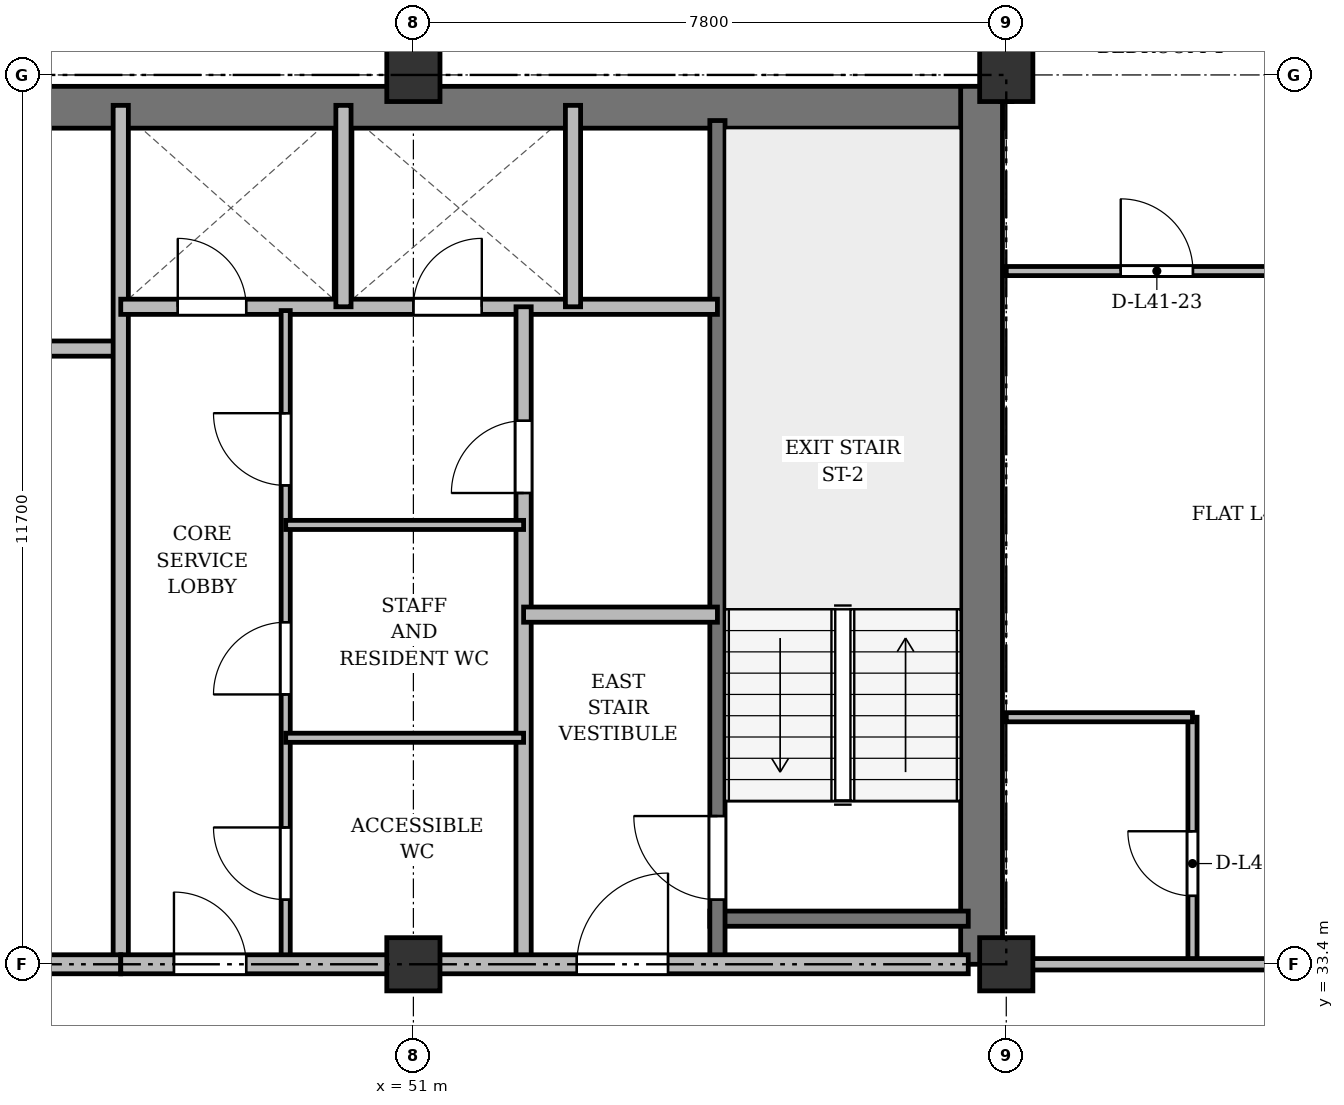
"""IFC4 building model, lengths in metres.
Left out: names, types, materials, properties, quantities, classifications, styles, units other than length and angle.
Written with IfcOpenShell. Run it as: python <this file> out.ifc"""

import sys

from ifc_helpers import new_model, si_unit, direction, frame, frame_2d, origin, origin_2d, place, context, subcontext, project, spatial, rectangle, extrude, source, transform, mapped, element, fill, save


model = new_model("IFC4")
c1 = context("Model", 3, precision=1e-05, world=origin(), true_north=direction((0.0, 1.0)))
c2 = subcontext(c1, "Body", "Model", "MODEL_VIEW")
j1 = project(units=[si_unit("LENGTHUNIT", "METRE"), si_unit("PLANEANGLEUNIT", "RADIAN")], contexts=[c1])
p1 = place(None, origin())
s1 = spatial("IfcSite", under=j1, at=p1, CompositionType="ELEMENT")
p2 = place(p1, origin())
s2 = spatial("IfcBuilding", under=s1, at=p2, CompositionType="ELEMENT")
p3 = place(p2, frame((0.0, 0.0, 157.3)))
s3 = spatial("IfcBuildingStorey", under=s2, at=p3, CompositionType="ELEMENT", Elevation=157.3)
m1 = source(origin(), c2, "Body", "SweptSolid", [
    extrude(rectangle(XDim=0.7, YDim=0.7, at=origin_2d()), origin(), (0.0, 0.0, 1.0), 3.6),
])
for number, where, z_axis, x_axis in (
    (1, (51.0, 33.4, 0.0), (0.0, 0.0, 1.0), (1.0, 0.0, 0.0)),
    (2, (51.0, 45.1, 0.0), (0.0, 0.0, 1.0), (1.0, 0.0, 0.0)),
    (3, (58.8, 33.4, 0.0), (0.0, 0.0, 1.0), (1.0, 0.0, 0.0)),
    (4, (58.8, 45.1, 0.0), (0.0, 0.0, 1.0), (1.0, 0.0, 0.0)),
):
    element("IfcColumn", number, at=place(p3, frame(where, z_axis=z_axis, x_axis=x_axis)), inside=s3, PredefinedType="COLUMN", context=c2, shape_type="MappedRepresentation", body=[
        mapped(m1, transform((0.0, 0.0, 0.0), x_axis=(1.0, 0.0, 0.0), y_axis=(0.0, 1.0, 0.0), z_axis=(0.0, 0.0, 1.0), scale=1.0)),
    ])
p4 = place(p3, frame((15.65, 44.675, 0.0), z_axis=(0.0, 0.0, 1.0), x_axis=(1.0, 0.0, 0.0)))
e5 = element("IfcWall", 5, at=p4, inside=s3, PredefinedType="SHEAR", context=c2, shape_type="SweptSolid", body=[
    extrude(rectangle(XDim=43.1, YDim=0.55, at=frame_2d((21.55, 0.0))), origin(), (0.0, 0.0, 1.0), 3.35),
])
p5 = place(p3, frame((58.475, 33.4, 0.0), z_axis=(0.0, 0.0, 1.0), x_axis=(0.0, 1.0, 0.0)))
e6 = element("IfcWall", 6, at=p5, inside=s3, PredefinedType="SHEAR", context=c2, shape_type="SweptSolid", body=[
    extrude(rectangle(XDim=11.55, YDim=0.55, at=frame_2d((5.775, 0.0))), origin(), (0.0, 0.0, 1.0), 3.35),
])
p6 = place(p3, frame((54.9, 34.0, 0.0), z_axis=(0.0, 0.0, 1.0), x_axis=(1.0, 0.0, 0.0)))
e7 = element("IfcWall", 7, at=p6, inside=s3, PredefinedType="SHEAR", context=c2, shape_type="SweptSolid", body=[
    extrude(rectangle(XDim=3.4, YDim=0.2, at=frame_2d((1.7, 0.0))), origin(), (0.0, 0.0, 1.0), 3.35),
])
p7 = place(p3, frame((55.0, 33.4, 0.0), z_axis=(0.0, 0.0, 1.0), x_axis=(0.0, 1.0, 0.0)))
e8 = element("IfcWall", 8, at=p7, inside=s3, PredefinedType="SHEAR", context=c2, shape_type="SweptSolid", body=[
    extrude(rectangle(XDim=11.1, YDim=0.2, at=frame_2d((5.55, 0.0))), origin(), (0.0, 0.0, 1.0), 3.35),
])
p8 = place(p7, frame((0.85, 0.0, 0.0)))
e9 = element("IfcOpeningElement", 9, at=p8, cuts=e8, PredefinedType="OPENING", context=c2, shape_type="SweptSolid", body=[
    extrude(rectangle(XDim=1.1, YDim=2.15, at=frame_2d((0.55, 1.075))), frame((0.0, 0.11, 0.0), z_axis=(0.0, -1.0, 0.0), x_axis=(1.0, 0.0, 0.0)), (0.0, 0.0, 1.0), 0.22),
])
p9 = place(p3, frame((40.25, 41.5, 0.0), z_axis=(0.0, 0.0, 1.0), x_axis=(1.0, 0.0, 0.0)))
e10 = element("IfcWall", 10, at=p9, inside=s3, PredefinedType="SOLIDWALL", context=c2, shape_type="SweptSolid", body=[
    extrude(rectangle(XDim=6.9, YDim=0.2, at=frame_2d((3.45, 0.0))), origin(), (0.0, 0.0, 1.0), 2.85),
])
p10 = place(p3, frame((47.15, 33.4, 0.0), z_axis=(0.0, 0.0, 1.0), x_axis=(0.0, 1.0, 0.0)))
e11 = element("IfcWall", 11, at=p10, inside=s3, PredefinedType="SOLIDWALL", context=c2, shape_type="SweptSolid", body=[
    extrude(rectangle(XDim=11.3, YDim=0.2, at=frame_2d((5.65, 0.0))), origin(), (0.0, 0.0, 1.0), 2.75),
])
p11 = place(p3, frame((33.3, 33.4, 0.0), z_axis=(0.0, 0.0, 1.0), x_axis=(1.0, 0.0, 0.0)))
e12 = element("IfcWall", 12, at=p11, inside=s3, PredefinedType="PARTITIONING", context=c2, shape_type="SweptSolid", body=[
    extrude(rectangle(XDim=13.85, YDim=0.25, at=frame_2d((6.925, 0.0))), origin(), (0.0, 0.0, 1.0), 2.75),
])
p12 = place(p11, frame((4.2, 0.0, 0.0)))
e13 = element("IfcOpeningElement", 13, at=p12, cuts=e12, PredefinedType="OPENING", context=c2, shape_type="SweptSolid", body=[
    extrude(rectangle(XDim=1.6, YDim=2.2, at=frame_2d((0.8, 1.1))), frame((0.0, 0.135, 0.0), z_axis=(0.0, -1.0, 0.0), x_axis=(1.0, 0.0, 0.0)), (0.0, 0.0, 1.0), 0.27),
])
p13 = place(p3, frame((47.15, 42.05, 0.0), z_axis=(0.0, 0.0, 1.0), x_axis=(1.0, 0.0, 0.0)))
e14 = element("IfcWall", 14, at=p13, inside=s3, PredefinedType="SOLIDWALL", context=c2, shape_type="SweptSolid", body=[
    extrude(rectangle(XDim=7.85, YDim=0.2, at=frame_2d((3.925, 0.0))), origin(), (0.0, 0.0, 1.0), 2.85),
])
p14 = place(p13, frame((0.75, 0.0, 0.0)))
e15 = element("IfcOpeningElement", 15, at=p14, cuts=e14, PredefinedType="OPENING", context=c2, shape_type="SweptSolid", body=[
    extrude(rectangle(XDim=0.9, YDim=2.1, at=frame_2d((0.45, 1.05))), frame((0.0, 0.11, 0.0), z_axis=(0.0, -1.0, 0.0), x_axis=(1.0, 0.0, 0.0)), (0.0, 0.0, 1.0), 0.22),
])
p15 = place(p13, frame((3.85, 0.0, 0.0)))
e16 = element("IfcOpeningElement", 16, at=p15, cuts=e14, PredefinedType="OPENING", context=c2, shape_type="SweptSolid", body=[
    extrude(rectangle(XDim=0.9, YDim=2.1, at=frame_2d((0.45, 1.05))), frame((0.0, 0.11, 0.0), z_axis=(0.0, -1.0, 0.0), x_axis=(1.0, 0.0, 0.0)), (0.0, 0.0, 1.0), 0.22),
])
for number, where, z_axis, x_axis in (
    (17, (50.08, 42.05, 0.0), (0.0, 0.0, 1.0), (0.0, 1.0, 0.0)),
    (18, (53.1, 42.05, 0.0), (0.0, 0.0, 1.0), (0.0, 1.0, 0.0)),
):
    element("IfcWall", number, at=place(p3, frame(where, z_axis=z_axis, x_axis=x_axis)), inside=s3, PredefinedType="SOLIDWALL", context=c2, shape_type="SweptSolid", body=[
        extrude(rectangle(XDim=2.65, YDim=0.2, at=frame_2d((1.325, 0.0))), origin(), (0.0, 0.0, 1.0), 3.35),
    ])
p16 = place(p3, frame((52.45, 33.4, 0.0), z_axis=(0.0, 0.0, 1.0), x_axis=(0.0, 1.0, 0.0)))
e19 = element("IfcWall", 19, at=p16, inside=s3, PredefinedType="PARTITIONING", context=c2, shape_type="SweptSolid", body=[
    extrude(rectangle(XDim=8.65, YDim=0.2, at=frame_2d((4.325, 0.0))), origin(), (0.0, 0.0, 1.0), 2.75),
])
p17 = place(p16, frame((6.2, 0.0, 0.0)))
e20 = element("IfcOpeningElement", 20, at=p17, cuts=e19, PredefinedType="OPENING", context=c2, shape_type="SweptSolid", body=[
    extrude(rectangle(XDim=0.95, YDim=2.15, at=frame_2d((0.475, 1.075))), frame((0.0, 0.11, 0.0), z_axis=(0.0, -1.0, 0.0), x_axis=(1.0, 0.0, 0.0)), (0.0, 0.0, 1.0), 0.22),
])
p18 = place(p3, frame((52.45, 38.0, 0.0), z_axis=(0.0, 0.0, 1.0), x_axis=(1.0, 0.0, 0.0)))
e21 = element("IfcWall", 21, at=p18, inside=s3, PredefinedType="PARTITIONING", context=c2, shape_type="SweptSolid", body=[
    extrude(rectangle(XDim=2.55, YDim=0.2, at=frame_2d((1.275, 0.0))), origin(), (0.0, 0.0, 1.0), 3.35),
])
p19 = place(p3, frame((49.32, 33.4, 0.0), z_axis=(0.0, 0.0, 1.0), x_axis=(0.0, 1.0, 0.0)))
e22 = element("IfcWall", 22, at=p19, inside=s3, PredefinedType="PARTITIONING", context=c2, shape_type="SweptSolid", body=[
    extrude(rectangle(XDim=8.6, YDim=0.12, at=frame_2d((4.3, 0.0))), origin(), (0.0, 0.0, 1.0), 2.75),
])
p20 = place(p19, frame((0.85, 0.0, 0.0)))
e23 = element("IfcOpeningElement", 23, at=p20, cuts=e22, PredefinedType="OPENING", context=c2, shape_type="SweptSolid", body=[
    extrude(rectangle(XDim=0.95, YDim=2.15, at=frame_2d((0.475, 1.075))), frame((0.0, 0.07, 0.0), z_axis=(0.0, -1.0, 0.0), x_axis=(1.0, 0.0, 0.0)), (0.0, 0.0, 1.0), 0.14),
])
p21 = place(p19, frame((3.55, 0.0, 0.0)))
e24 = element("IfcOpeningElement", 24, at=p21, cuts=e22, PredefinedType="OPENING", context=c2, shape_type="SweptSolid", body=[
    extrude(rectangle(XDim=0.95, YDim=2.15, at=frame_2d((0.475, 1.075))), frame((0.0, 0.07, 0.0), z_axis=(0.0, -1.0, 0.0), x_axis=(1.0, 0.0, 0.0)), (0.0, 0.0, 1.0), 0.14),
])
p22 = place(p19, frame((6.3, 0.0, 0.0)))
e25 = element("IfcOpeningElement", 25, at=p22, cuts=e22, PredefinedType="OPENING", context=c2, shape_type="SweptSolid", body=[
    extrude(rectangle(XDim=0.95, YDim=2.15, at=frame_2d((0.475, 1.075))), frame((0.0, 0.07, 0.0), z_axis=(0.0, -1.0, 0.0), x_axis=(1.0, 0.0, 0.0)), (0.0, 0.0, 1.0), 0.14),
])
for number, where, z_axis, x_axis in (
    (26, (49.32, 36.38, 0.0), (0.0, 0.0, 1.0), (1.0, 0.0, 0.0)),
    (27, (49.32, 39.18, 0.0), (0.0, 0.0, 1.0), (1.0, 0.0, 0.0)),
):
    element("IfcWall", number, at=place(p3, frame(where, z_axis=z_axis, x_axis=x_axis)), inside=s3, PredefinedType="PARTITIONING", context=c2, shape_type="SweptSolid", body=[
        extrude(rectangle(XDim=3.13, YDim=0.12, at=frame_2d((1.565, 0.0))), origin(), (0.0, 0.0, 1.0), 2.85),
    ])
p23 = place(p3, frame((47.15, 33.4, 0.0), z_axis=(0.0, 0.0, 1.0), x_axis=(1.0, 0.0, 0.0)))
e28 = element("IfcWall", 28, at=p23, inside=s3, PredefinedType="PARTITIONING", context=c2, shape_type="SweptSolid", body=[
    extrude(rectangle(XDim=11.15, YDim=0.25, at=frame_2d((5.575, 0.0))), origin(), (0.0, 0.0, 1.0), 2.75),
])
p24 = place(p23, frame((0.7, 0.0, 0.0)))
e29 = element("IfcOpeningElement", 29, at=p24, cuts=e28, PredefinedType="OPENING", context=c2, shape_type="SweptSolid", body=[
    extrude(rectangle(XDim=0.95, YDim=2.15, at=frame_2d((0.475, 1.075))), frame((0.0, 0.135, 0.0), z_axis=(0.0, -1.0, 0.0), x_axis=(1.0, 0.0, 0.0)), (0.0, 0.0, 1.0), 0.27),
])
p25 = place(p23, frame((6.0, 0.0, 0.0)))
e30 = element("IfcOpeningElement", 30, at=p25, cuts=e28, PredefinedType="OPENING", context=c2, shape_type="SweptSolid", body=[
    extrude(rectangle(XDim=1.2, YDim=2.15, at=frame_2d((0.6, 1.075))), frame((0.0, 0.135, 0.0), z_axis=(0.0, -1.0, 0.0), x_axis=(1.0, 0.0, 0.0)), (0.0, 0.0, 1.0), 0.27),
])
p26 = place(p3, frame((61.25, 33.4, 0.0), z_axis=(0.0, 0.0, 1.0), x_axis=(0.0, 1.0, 0.0)))
e31 = element("IfcWall", 31, at=p26, inside=s3, PredefinedType="PARTITIONING", context=c2, shape_type="SweptSolid", body=[
    extrude(rectangle(XDim=3.25, YDim=0.12, at=frame_2d((1.625, 0.0))), origin(), (0.0, 0.0, 1.0), 2.75),
])
p27 = place(p26, frame((0.9, 0.0, 0.0)))
e32 = element("IfcOpeningElement", 32, at=p27, cuts=e31, PredefinedType="OPENING", context=c2, shape_type="SweptSolid", body=[
    extrude(rectangle(XDim=0.85, YDim=2.1, at=frame_2d((0.425, 1.05))), frame((0.0, 0.07, 0.0), z_axis=(0.0, -1.0, 0.0), x_axis=(1.0, 0.0, 0.0)), (0.0, 0.0, 1.0), 0.14),
])
p28 = place(p3, frame((58.8, 36.65, 0.0), z_axis=(0.0, 0.0, 1.0), x_axis=(1.0, 0.0, 0.0)))
e33 = element("IfcWall", 33, at=p28, inside=s3, PredefinedType="PARTITIONING", context=c2, shape_type="SweptSolid", body=[
    extrude(rectangle(XDim=2.45, YDim=0.12, at=frame_2d((1.225, 0.0))), origin(), (0.0, 0.0, 1.0), 2.85),
])
p29 = place(p3, frame((58.8, 42.52, 0.0), z_axis=(0.0, 0.0, 1.0), x_axis=(1.0, 0.0, 0.0)))
e34 = element("IfcWall", 34, at=p29, inside=s3, PredefinedType="PARTITIONING", context=c2, shape_type="SweptSolid", body=[
    extrude(rectangle(XDim=3.775, YDim=0.12, at=frame_2d((1.887, 0.0))), origin(), (0.0, 0.0, 1.0), 2.85),
])
p30 = place(p29, frame((1.506, 0.0, 0.0)))
e35 = element("IfcOpeningElement", 35, at=p30, cuts=e34, PredefinedType="OPENING", context=c2, shape_type="SweptSolid", body=[
    extrude(rectangle(XDim=0.95, YDim=2.15, at=frame_2d((0.475, 1.075))), frame((0.0, 0.07, 0.0), z_axis=(0.0, -1.0, 0.0), x_axis=(1.0, 0.0, 0.0)), (0.0, 0.0, 1.0), 0.14),
])
p31 = place(p3, frame((58.8, 33.4, 0.0), z_axis=(0.0, 0.0, 1.0), x_axis=(1.0, 0.0, 0.0)))
e36 = element("IfcWall", 36, at=p31, inside=s3, PredefinedType="PARTITIONING", context=c2, shape_type="SweptSolid", body=[
    extrude(rectangle(XDim=7.55, YDim=0.15, at=frame_2d((3.775, 0.0))), origin(), (0.0, 0.0, 1.0), 2.75),
])
p32 = place(p31, frame((4.375, 0.0, 0.0)))
e37 = element("IfcOpeningElement", 37, at=p32, cuts=e36, PredefinedType="OPENING", context=c2, shape_type="SweptSolid", body=[
    extrude(rectangle(XDim=0.95, YDim=2.15, at=frame_2d((0.475, 1.075))), frame((0.0, 0.085, 0.0), z_axis=(0.0, -1.0, 0.0), x_axis=(1.0, 0.0, 0.0)), (0.0, 0.0, 1.0), 0.17),
])
p33 = place(p3, frame((58.8, 44.75, 0.0), z_axis=(0.0, 0.0, 1.0), x_axis=(0.0, 1.0, 0.0)))
e38 = element("IfcWall", 38, at=p33, inside=s3, PredefinedType="PARTITIONING", context=c2, shape_type="SweptSolid", body=[
    extrude(rectangle(XDim=3.61, YDim=0.15, at=frame_2d((1.805, 0.0))), origin(), (0.0, 0.0, 1.0), 2.85),
])
p34 = place(p33, frame((1.1, 0.0, 0.0)))
e39 = element("IfcOpeningElement", 39, at=p34, cuts=e38, PredefinedType="OPENING", context=c2, shape_type="SweptSolid", body=[
    extrude(rectangle(XDim=0.95, YDim=2.15, at=frame_2d((0.475, 1.075))), frame((0.0, 0.085, 0.0), z_axis=(0.0, -1.0, 0.0), x_axis=(1.0, 0.0, 0.0)), (0.0, 0.0, 1.0), 0.17),
])
m2 = source(origin(), c2, "Body", "SweptSolid", [
    extrude(rectangle(XDim=1.1, YDim=2.15, at=frame_2d((0.55, 1.075))), frame((0.0, 0.025, 0.0), z_axis=(0.0, -1.0, 0.0), x_axis=(1.0, 0.0, 0.0)), (0.0, 0.0, 1.0), 0.05),
])
p35 = place(p8, origin())
e40 = element("IfcDoor", 40, at=p35, inside=s3, OperationType="SINGLE_SWING_RIGHT", PredefinedType="DOOR", context=c2, shape_type="MappedRepresentation", body=[
    mapped(m2, transform((0.0, 0.0, 0.0), x_axis=(1.0, 0.0, 0.0), y_axis=(0.0, 1.0, 0.0), z_axis=(0.0, 0.0, 1.0), scale=1.0)),
])
fill(e9, e40)
m3 = source(origin(), c2, "Body", "SweptSolid", [
    extrude(rectangle(XDim=0.9, YDim=2.1, at=frame_2d((0.45, 1.05))), frame((0.0, 0.025, 0.0), z_axis=(0.0, -1.0, 0.0), x_axis=(1.0, 0.0, 0.0)), (0.0, 0.0, 1.0), 0.05),
])
p36 = place(p14, origin())
e41 = element("IfcDoor", 41, at=p36, inside=s3, OperationType="SINGLE_SWING_LEFT", PredefinedType="DOOR", context=c2, shape_type="MappedRepresentation", body=[
    mapped(m3, transform((0.0, 0.0, 0.0), x_axis=(1.0, 0.0, 0.0), y_axis=(0.0, 1.0, 0.0), z_axis=(0.0, 0.0, 1.0), scale=1.0)),
])
fill(e15, e41)
p37 = place(p15, origin())
e42 = element("IfcDoor", 42, at=p37, inside=s3, OperationType="SINGLE_SWING_RIGHT", PredefinedType="DOOR", context=c2, shape_type="MappedRepresentation", body=[
    mapped(m3, transform((0.0, 0.0, 0.0), x_axis=(1.0, 0.0, 0.0), y_axis=(0.0, 1.0, 0.0), z_axis=(0.0, 0.0, 1.0), scale=1.0)),
])
fill(e16, e42)
m4 = source(origin(), c2, "Body", "SweptSolid", [
    extrude(rectangle(XDim=0.95, YDim=2.15, at=frame_2d((0.475, 1.075))), frame((0.0, 0.025, 0.0), z_axis=(0.0, -1.0, 0.0), x_axis=(1.0, 0.0, 0.0)), (0.0, 0.0, 1.0), 0.05),
])
p38 = place(p17, origin())
e43 = element("IfcDoor", 43, at=p38, inside=s3, OperationType="SINGLE_SWING_LEFT", PredefinedType="DOOR", context=c2, shape_type="MappedRepresentation", body=[
    mapped(m4, transform((0.0, 0.0, 0.0), x_axis=(1.0, 0.0, 0.0), y_axis=(0.0, 1.0, 0.0), z_axis=(0.0, 0.0, 1.0), scale=1.0)),
])
fill(e20, e43)
p39 = place(p20, origin())
e44 = element("IfcDoor", 44, at=p39, inside=s3, OperationType="SINGLE_SWING_RIGHT", PredefinedType="DOOR", context=c2, shape_type="MappedRepresentation", body=[
    mapped(m4, transform((0.0, 0.0, 0.0), x_axis=(1.0, 0.0, 0.0), y_axis=(0.0, 1.0, 0.0), z_axis=(0.0, 0.0, 1.0), scale=1.0)),
])
fill(e23, e44)
p40 = place(p21, origin())
e45 = element("IfcDoor", 45, at=p40, inside=s3, OperationType="SINGLE_SWING_LEFT", PredefinedType="DOOR", context=c2, shape_type="MappedRepresentation", body=[
    mapped(m4, transform((0.0, 0.0, 0.0), x_axis=(1.0, 0.0, 0.0), y_axis=(0.0, 1.0, 0.0), z_axis=(0.0, 0.0, 1.0), scale=1.0)),
])
fill(e24, e45)
p41 = place(p22, origin())
e46 = element("IfcDoor", 46, at=p41, inside=s3, OperationType="SINGLE_SWING_RIGHT", PredefinedType="DOOR", context=c2, shape_type="MappedRepresentation", body=[
    mapped(m4, transform((0.0, 0.0, 0.0), x_axis=(1.0, 0.0, 0.0), y_axis=(0.0, 1.0, 0.0), z_axis=(0.0, 0.0, 1.0), scale=1.0)),
])
fill(e25, e46)
p42 = place(p24, origin())
e47 = element("IfcDoor", 47, at=p42, inside=s3, OperationType="SINGLE_SWING_LEFT", PredefinedType="DOOR", context=c2, shape_type="MappedRepresentation", body=[
    mapped(m4, transform((0.0, 0.0, 0.0), x_axis=(1.0, 0.0, 0.0), y_axis=(0.0, 1.0, 0.0), z_axis=(0.0, 0.0, 1.0), scale=1.0)),
])
fill(e29, e47)
m5 = source(origin(), c2, "Body", "SweptSolid", [
    extrude(rectangle(XDim=1.2, YDim=2.15, at=frame_2d((0.6, 1.075))), frame((0.0, 0.025, 0.0), z_axis=(0.0, -1.0, 0.0), x_axis=(1.0, 0.0, 0.0)), (0.0, 0.0, 1.0), 0.05),
])
p43 = place(p25, origin())
e48 = element("IfcDoor", 48, at=p43, inside=s3, OperationType="SINGLE_SWING_RIGHT", PredefinedType="DOOR", context=c2, shape_type="MappedRepresentation", body=[
    mapped(m5, transform((0.0, 0.0, 0.0), x_axis=(1.0, 0.0, 0.0), y_axis=(0.0, 1.0, 0.0), z_axis=(0.0, 0.0, 1.0), scale=1.0)),
])
fill(e30, e48)
m6 = source(origin(), c2, "Body", "SweptSolid", [
    extrude(rectangle(XDim=0.85, YDim=2.1, at=frame_2d((0.425, 1.05))), frame((0.0, 0.025, 0.0), z_axis=(0.0, -1.0, 0.0), x_axis=(1.0, 0.0, 0.0)), (0.0, 0.0, 1.0), 0.05),
])
p44 = place(p27, origin())
e49 = element("IfcDoor", 49, at=p44, inside=s3, OperationType="SINGLE_SWING_RIGHT", PredefinedType="DOOR", context=c2, shape_type="MappedRepresentation", body=[
    mapped(m6, transform((0.0, 0.0, 0.0), x_axis=(1.0, 0.0, 0.0), y_axis=(0.0, 1.0, 0.0), z_axis=(0.0, 0.0, 1.0), scale=1.0)),
])
fill(e32, e49)
p45 = place(p30, origin())
e50 = element("IfcDoor", 50, at=p45, inside=s3, OperationType="SINGLE_SWING_LEFT", PredefinedType="DOOR", context=c2, shape_type="MappedRepresentation", body=[
    mapped(m4, transform((0.0, 0.0, 0.0), x_axis=(1.0, 0.0, 0.0), y_axis=(0.0, 1.0, 0.0), z_axis=(0.0, 0.0, 1.0), scale=1.0)),
])
fill(e35, e50)
save(model, sys.argv[1])
